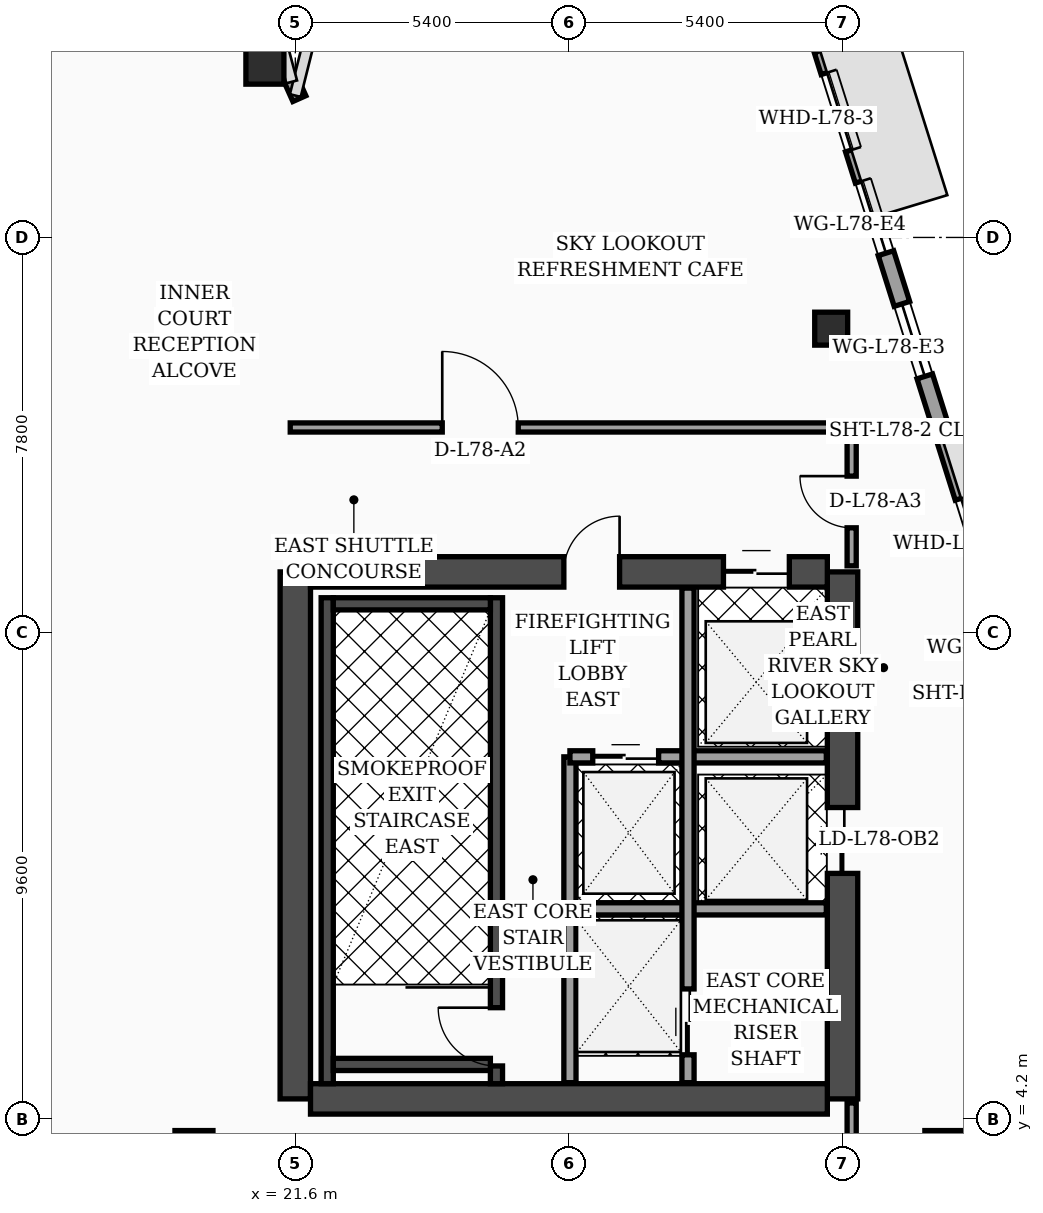
"""IFC4 building model, lengths in metres.
Left out: names, types, materials, properties, quantities, classifications, styles, units other than length and angle.
Written with IfcOpenShell. Run it as: python <this file> out.ifc"""

import sys

from ifc_helpers import new_model, si_unit, direction, frame, frame_2d, origin, origin_2d, place, context, subcontext, project, spatial, rectangle, hollow_rectangle, extrude, element, fill, save


model = new_model("IFC4")
c1 = context("Model", 3, precision=1e-05, world=origin(), true_north=direction((0.0, 1.0)))
c2 = subcontext(c1, "Body", "Model", "MODEL_VIEW")
j1 = project(units=[si_unit("LENGTHUNIT", "METRE"), si_unit("PLANEANGLEUNIT", "RADIAN")], contexts=[c1])
p1 = place(None, origin())
s1 = spatial("IfcSite", under=j1, at=p1, CompositionType="ELEMENT")
p2 = place(p1, origin())
s2 = spatial("IfcBuilding", under=s1, at=p2, CompositionType="ELEMENT")
p3 = place(p2, frame((0.0, 0.0, 316.0)))
s3 = spatial("IfcBuildingStorey", under=s2, at=p3, CompositionType="ELEMENT", Elevation=316.0)
p4 = place(p3, frame((21.6, 4.6, 0.0), z_axis=(0.0, 0.0, 1.0), x_axis=(0.0, 1.0, 0.0)))
e1 = element("IfcWall", 1, at=p4, inside=s3, PredefinedType="SHEAR", context=c2, shape_type="SweptSolid", body=[
    extrude(rectangle(XDim=10.4, YDim=0.6, at=frame_2d((5.2, 0.0))), origin(), (0.0, 0.0, 1.0), 4.26),
])
p5 = place(p3, frame((32.4, 4.6, 0.0), z_axis=(0.0, 0.0, 1.0), x_axis=(0.0, 1.0, 0.0)))
e2 = element("IfcWall", 2, at=p5, inside=s3, PredefinedType="SHEAR", context=c2, shape_type="SweptSolid", body=[
    extrude(rectangle(XDim=10.4, YDim=0.6, at=frame_2d((5.2, 0.0))), origin(), (0.0, 0.0, 1.0), 4.26),
])
p6 = place(p5, frame((4.45, 0.0, 0.0)))
e3 = element("IfcOpeningElement", 3, at=p6, cuts=e2, PredefinedType="OPENING", context=c2, shape_type="SweptSolid", body=[
    extrude(rectangle(XDim=1.3, YDim=2.35, at=frame_2d((0.65, 1.175))), frame((0.0, 0.31, 0.0), z_axis=(0.0, -1.0, 0.0), x_axis=(1.0, 0.0, 0.0)), (0.0, 0.0, 1.0), 0.62),
])
p7 = place(p3, frame((21.9, 15.0, 0.0), z_axis=(0.0, 0.0, 1.0), x_axis=(1.0, 0.0, 0.0)))
e4 = element("IfcWall", 4, at=p7, inside=s3, PredefinedType="SHEAR", context=c2, shape_type="SweptSolid", body=[
    extrude(rectangle(XDim=10.2, YDim=0.6, at=frame_2d((5.1, 0.0))), origin(), (0.0, 0.0, 1.0), 4.26),
])
p8 = place(p7, frame((5.0, 0.0, 0.0)))
e5 = element("IfcOpeningElement", 5, at=p8, cuts=e4, PredefinedType="OPENING", context=c2, shape_type="SweptSolid", body=[
    extrude(rectangle(XDim=1.1, YDim=2.2, at=frame_2d((0.55, 1.1))), frame((0.0, 0.31, 0.0), z_axis=(0.0, -1.0, 0.0), x_axis=(1.0, 0.0, 0.0)), (0.0, 0.0, 1.0), 0.62),
])
p9 = place(p7, frame((8.15, 0.0, 0.0)))
e6 = element("IfcOpeningElement", 6, at=p9, cuts=e4, PredefinedType="OPENING", context=c2, shape_type="SweptSolid", body=[
    extrude(rectangle(XDim=1.3, YDim=2.35, at=frame_2d((0.65, 1.175))), frame((0.0, 0.31, 0.0), z_axis=(0.0, -1.0, 0.0), x_axis=(1.0, 0.0, 0.0)), (0.0, 0.0, 1.0), 0.62),
])
p10 = place(p3, frame((21.9, 4.6, 0.0), z_axis=(0.0, 0.0, 1.0), x_axis=(1.0, 0.0, 0.0)))
e7 = element("IfcWall", 7, at=p10, inside=s3, PredefinedType="SHEAR", context=c2, shape_type="SweptSolid", body=[
    extrude(rectangle(XDim=10.2, YDim=0.6, at=frame_2d((5.1, 0.0))), origin(), (0.0, 0.0, 1.0), 4.26),
])
p11 = place(p3, frame((22.23, 4.9, 0.0), z_axis=(0.0, 0.0, 1.0), x_axis=(0.0, 1.0, 0.0)))
e8 = element("IfcWall", 8, at=p11, inside=s3, PredefinedType="SOLIDWALL", context=c2, shape_type="SweptSolid", body=[
    extrude(rectangle(XDim=9.59, YDim=0.24, at=frame_2d((4.795, 0.0))), origin(), (0.0, 0.0, 1.0), 4.26),
])
p12 = place(p3, frame((25.57, 4.9, 0.0), z_axis=(0.0, 0.0, 1.0), x_axis=(0.0, 1.0, 0.0)))
e9 = element("IfcWall", 9, at=p12, inside=s3, PredefinedType="SOLIDWALL", context=c2, shape_type="SweptSolid", body=[
    extrude(rectangle(XDim=9.59, YDim=0.24, at=frame_2d((4.795, 0.0))), origin(), (0.0, 0.0, 1.0), 4.26),
])
p13 = place(p12, frame((0.35, 0.0, 0.0)))
e10 = element("IfcOpeningElement", 10, at=p13, cuts=e9, PredefinedType="OPENING", context=c2, shape_type="SweptSolid", body=[
    extrude(rectangle(XDim=1.15, YDim=2.2, at=frame_2d((0.575, 1.1))), frame((0.0, 0.13, 0.0), z_axis=(0.0, -1.0, 0.0), x_axis=(1.0, 0.0, 0.0)), (0.0, 0.0, 1.0), 0.26),
])
for number, where, z_axis, x_axis in (
    (11, (22.35, 5.28, 0.0), (0.0, 0.0, 1.0), (1.0, 0.0, 0.0)),
    (12, (22.35, 14.37, 0.0), (0.0, 0.0, 1.0), (1.0, 0.0, 0.0)),
):
    element("IfcWall", number, at=place(p3, frame(where, z_axis=z_axis, x_axis=x_axis)), inside=s3, PredefinedType="SOLIDWALL", context=c2, shape_type="SweptSolid", body=[
        extrude(rectangle(XDim=3.1, YDim=0.24, at=frame_2d((1.55, 0.0))), origin(), (0.0, 0.0, 1.0), 4.26),
    ])
for number, where, z_axis, x_axis in (
    (13, (21.0, 25.0, 0.0), (0.0, 0.0, 1.0), (1.0, 0.0, 0.0)),
    (14, (19.6, 3.6, 0.0), (0.0, 0.0, 1.0), (1.0, 0.0, 0.0)),
    (15, (34.4, 3.6, 0.0), (0.0, 0.0, 1.0), (1.0, 0.0, 0.0)),
):
    element("IfcColumn", number, at=place(p3, frame(where, z_axis=z_axis, x_axis=x_axis)), inside=s3, PredefinedType="COLUMN", context=c2, shape_type="SweptSolid", body=[
        extrude(hollow_rectangle(XDim=0.75, YDim=0.75, WallThickness=0.032, at=origin_2d()), origin(), (0.0, 0.0, 1.0), 4.26),
    ])
p14 = place(p3, frame((32.176, 19.8, 0.0), z_axis=(0.0, 0.0, 1.0), x_axis=(1.0, 0.0, 0.0)))
e16 = element("IfcColumn", 16, at=p14, inside=s3, PredefinedType="COLUMN", context=c2, shape_type="SweptSolid", body=[
    extrude(hollow_rectangle(XDim=0.65, YDim=0.65, WallThickness=0.028, at=origin_2d()), origin(), (0.0, 0.0, 1.0), 4.26),
])
p15 = place(p3, frame((21.68, 24.34, 0.0), z_axis=(0.0, 0.0, 1.0), x_axis=(-0.40758134973, 0.913168901875, 0.0)))
e17 = element("IfcWall", 17, at=p15, inside=s3, PredefinedType="SOLIDWALL", context=c2, shape_type="SweptSolid", body=[
    extrude(rectangle(XDim=0.471, YDim=0.28, at=frame_2d((0.235, 0.0))), origin(), (0.0, 0.0, 1.0), 4.26),
])
p16 = place(p3, frame((38.23, 5.505, 0.0), z_axis=(0.0, 0.0, 1.0), x_axis=(-0.300509063924, 0.953778958931, 0.0)))
e18 = element("IfcWall", 18, at=p16, inside=s3, PredefinedType="SOLIDWALL", context=c2, shape_type="SweptSolid", body=[
    extrude(rectangle(XDim=30.814, YDim=0.32, at=frame_2d((15.407, 0.0))), origin(), (0.0, 0.0, 1.0), 4.26),
])
p17 = place(p16, frame((4.437, 0.0, 0.7)))
e19 = element("IfcOpeningElement", 19, at=p17, cuts=e18, PredefinedType="OPENING", context=c2, shape_type="SweptSolid", body=[
    extrude(rectangle(XDim=1.6, YDim=1.65, at=frame_2d((0.8, 0.825))), frame((0.0, 0.17, 0.0), z_axis=(0.0, -1.0, 0.0), x_axis=(1.0, 0.0, 0.0)), (0.0, 0.0, 1.0), 0.34),
])
p18 = place(p16, frame((9.889, 0.0, 0.7)))
e20 = element("IfcOpeningElement", 20, at=p18, cuts=e18, PredefinedType="OPENING", context=c2, shape_type="SweptSolid", body=[
    extrude(rectangle(XDim=1.6, YDim=1.65, at=frame_2d((0.8, 0.825))), frame((0.0, 0.17, 0.0), z_axis=(0.0, -1.0, 0.0), x_axis=(1.0, 0.0, 0.0)), (0.0, 0.0, 1.0), 0.34),
])
p19 = place(p16, frame((18.696, 0.0, 0.7)))
e21 = element("IfcOpeningElement", 21, at=p19, cuts=e18, PredefinedType="OPENING", context=c2, shape_type="SweptSolid", body=[
    extrude(rectangle(XDim=1.6, YDim=1.65, at=frame_2d((0.8, 0.825))), frame((0.0, 0.17, 0.0), z_axis=(0.0, -1.0, 0.0), x_axis=(1.0, 0.0, 0.0)), (0.0, 0.0, 1.0), 0.34),
])
p20 = place(p16, frame((1.6, 0.0, 0.75)))
e22 = element("IfcOpeningElement", 22, at=p20, cuts=e18, PredefinedType="OPENING", context=c2, shape_type="SweptSolid", body=[
    extrude(rectangle(XDim=1.5, YDim=1.6, at=frame_2d((0.75, 0.8))), frame((0.0, 0.17, 0.0), z_axis=(0.0, -1.0, 0.0), x_axis=(1.0, 0.0, 0.0)), (0.0, 0.0, 1.0), 0.34),
])
p21 = place(p16, frame((7.8, 0.0, 0.75)))
e23 = element("IfcOpeningElement", 23, at=p21, cuts=e18, PredefinedType="OPENING", context=c2, shape_type="SweptSolid", body=[
    extrude(rectangle(XDim=1.5, YDim=1.6, at=frame_2d((0.75, 0.8))), frame((0.0, 0.17, 0.0), z_axis=(0.0, -1.0, 0.0), x_axis=(1.0, 0.0, 0.0)), (0.0, 0.0, 1.0), 0.34),
])
p22 = place(p16, frame((14.0, 0.0, 0.75)))
e24 = element("IfcOpeningElement", 24, at=p22, cuts=e18, PredefinedType="OPENING", context=c2, shape_type="SweptSolid", body=[
    extrude(rectangle(XDim=1.5, YDim=1.6, at=frame_2d((0.75, 0.8))), frame((0.0, 0.17, 0.0), z_axis=(0.0, -1.0, 0.0), x_axis=(1.0, 0.0, 0.0)), (0.0, 0.0, 1.0), 0.34),
])
p23 = place(p16, frame((16.55, 0.0, 0.75)))
e25 = element("IfcOpeningElement", 25, at=p23, cuts=e18, PredefinedType="OPENING", context=c2, shape_type="SweptSolid", body=[
    extrude(rectangle(XDim=1.5, YDim=1.6, at=frame_2d((0.75, 0.8))), frame((0.0, 0.17, 0.0), z_axis=(0.0, -1.0, 0.0), x_axis=(1.0, 0.0, 0.0)), (0.0, 0.0, 1.0), 0.34),
])
p24 = place(p16, frame((20.75, 0.0, 0.75)))
e26 = element("IfcOpeningElement", 26, at=p24, cuts=e18, PredefinedType="OPENING", context=c2, shape_type="SweptSolid", body=[
    extrude(rectangle(XDim=1.5, YDim=1.6, at=frame_2d((0.75, 0.8))), frame((0.0, 0.17, 0.0), z_axis=(0.0, -1.0, 0.0), x_axis=(1.0, 0.0, 0.0)), (0.0, 0.0, 1.0), 0.34),
])
p25 = place(p16, frame((23.3, 0.0, 0.75)))
e27 = element("IfcOpeningElement", 27, at=p25, cuts=e18, PredefinedType="OPENING", context=c2, shape_type="SweptSolid", body=[
    extrude(rectangle(XDim=1.5, YDim=1.6, at=frame_2d((0.75, 0.8))), frame((0.0, 0.17, 0.0), z_axis=(0.0, -1.0, 0.0), x_axis=(1.0, 0.0, 0.0)), (0.0, 0.0, 1.0), 0.34),
])
p26 = place(p16, frame((26.4, 0.0, 0.75)))
e28 = element("IfcOpeningElement", 28, at=p26, cuts=e18, PredefinedType="OPENING", context=c2, shape_type="SweptSolid", body=[
    extrude(rectangle(XDim=1.5, YDim=1.6, at=frame_2d((0.75, 0.8))), frame((0.0, 0.17, 0.0), z_axis=(0.0, -1.0, 0.0), x_axis=(1.0, 0.0, 0.0)), (0.0, 0.0, 1.0), 0.34),
])
p27 = place(p3, frame((27.02, 4.92, 0.0), z_axis=(0.0, 0.0, 1.0), x_axis=(0.0, 1.0, 0.0)))
e29 = element("IfcWall", 29, at=p27, inside=s3, PredefinedType="SOLIDWALL", context=c2, shape_type="SweptSolid", body=[
    extrude(rectangle(XDim=6.43, YDim=0.24, at=frame_2d((3.215, 0.0))), origin(), (0.0, 0.0, 1.0), 2.54),
])
p28 = place(p3, frame((27.02, 11.35, 0.0), z_axis=(0.0, 0.0, 1.0), x_axis=(1.0, 0.0, 0.0)))
e30 = element("IfcWall", 30, at=p28, inside=s3, PredefinedType="SOLIDWALL", context=c2, shape_type="SweptSolid", body=[
    extrude(rectangle(XDim=5.06, YDim=0.24, at=frame_2d((2.53, 0.0))), origin(), (0.0, 0.0, 1.0), 2.54),
])
p29 = place(p28, frame((0.45, 0.0, 0.0)))
e31 = element("IfcOpeningElement", 31, at=p29, cuts=e30, PredefinedType="OPENING", context=c2, shape_type="SweptSolid", body=[
    extrude(rectangle(XDim=1.3, YDim=2.35, at=frame_2d((0.65, 1.175))), frame((0.0, 0.13, 0.0), z_axis=(0.0, -1.0, 0.0), x_axis=(1.0, 0.0, 0.0)), (0.0, 0.0, 1.0), 0.26),
])
p30 = place(p3, frame((27.02, 8.35, 0.0), z_axis=(0.0, 0.0, 1.0), x_axis=(1.0, 0.0, 0.0)))
e32 = element("IfcWall", 32, at=p30, inside=s3, PredefinedType="SOLIDWALL", context=c2, shape_type="SweptSolid", body=[
    extrude(rectangle(XDim=5.06, YDim=0.24, at=frame_2d((2.53, 0.0))), origin(), (0.0, 0.0, 1.0), 2.54),
])
p31 = place(p3, frame((29.35, 4.92, 0.0), z_axis=(0.0, 0.0, 1.0), x_axis=(0.0, 1.0, 0.0)))
e33 = element("IfcWall", 33, at=p31, inside=s3, PredefinedType="SOLIDWALL", context=c2, shape_type="SweptSolid", body=[
    extrude(rectangle(XDim=9.76, YDim=0.24, at=frame_2d((4.88, 0.0))), origin(), (0.0, 0.0, 1.0), 2.54),
])
p32 = place(p31, frame((0.55, 0.0, 0.0)))
e34 = element("IfcOpeningElement", 34, at=p32, cuts=e33, PredefinedType="OPENING", context=c2, shape_type="SweptSolid", body=[
    extrude(rectangle(XDim=1.3, YDim=2.35, at=frame_2d((0.65, 1.175))), frame((0.0, 0.13, 0.0), z_axis=(0.0, -1.0, 0.0), x_axis=(1.0, 0.0, 0.0)), (0.0, 0.0, 1.0), 0.26),
])
p33 = place(p3, frame((21.5, 17.85, 0.0), z_axis=(0.0, 0.0, 1.0), x_axis=(1.0, 0.0, 0.0)))
e35 = element("IfcWall", 35, at=p33, inside=s3, PredefinedType="PARTITIONING", context=c2, shape_type="SweptSolid", body=[
    extrude(rectangle(XDim=12.78, YDim=0.18, at=frame_2d((6.39, 0.0))), origin(), (0.0, 0.0, 1.0), 2.54),
])
p34 = place(p33, frame((3.0, 0.0, 0.0)))
e36 = element("IfcOpeningElement", 36, at=p34, cuts=e35, PredefinedType="OPENING", context=c2, shape_type="SweptSolid", body=[
    extrude(rectangle(XDim=1.5, YDim=2.22, at=frame_2d((0.75, 1.11))), frame((0.0, 0.1, 0.0), z_axis=(0.0, -1.0, 0.0), x_axis=(1.0, 0.0, 0.0)), (0.0, 0.0, 1.0), 0.2),
])
p35 = place(p3, frame((32.58, 15.12, 0.0), z_axis=(0.0, 0.0, 1.0), x_axis=(0.0, 1.0, 0.0)))
e37 = element("IfcWall", 37, at=p35, inside=s3, PredefinedType="PARTITIONING", context=c2, shape_type="SweptSolid", body=[
    extrude(rectangle(XDim=2.66, YDim=0.18, at=frame_2d((1.33, 0.0))), origin(), (0.0, 0.0, 1.0), 2.54),
])
p36 = place(p35, frame((0.75, 0.0, 0.0)))
e38 = element("IfcOpeningElement", 38, at=p36, cuts=e37, PredefinedType="OPENING", context=c2, shape_type="SweptSolid", body=[
    extrude(rectangle(XDim=1.02, YDim=2.2, at=frame_2d((0.51, 1.1))), frame((0.0, 0.1, 0.0), z_axis=(0.0, -1.0, 0.0), x_axis=(1.0, 0.0, 0.0)), (0.0, 0.0, 1.0), 0.2),
])
p37 = place(p3, frame((32.58, 2.6, 0.0), z_axis=(0.0, 0.0, 1.0), x_axis=(0.0, 1.0, 0.0)))
e39 = element("IfcWall", 39, at=p37, inside=s3, PredefinedType="PARTITIONING", context=c2, shape_type="SweptSolid", body=[
    extrude(rectangle(XDim=1.92, YDim=0.18, at=frame_2d((0.96, 0.0))), origin(), (0.0, 0.0, 1.0), 2.54),
])
p38 = place(p18, origin())
e40 = element("IfcWindow", 40, at=p38, inside=s3, PartitioningType="SINGLE_PANEL", PredefinedType="WINDOW", context=c2, shape_type="SweptSolid", body=[
    extrude(rectangle(XDim=1.6, YDim=1.65, at=frame_2d((0.8, 0.825))), frame((0.0, 0.03, 0.0), z_axis=(0.0, -1.0, 0.0), x_axis=(1.0, 0.0, 0.0)), (0.0, 0.0, 1.0), 0.06),
])
fill(e20, e40)
p39 = place(p19, origin())
e41 = element("IfcWindow", 41, at=p39, inside=s3, PartitioningType="SINGLE_PANEL", PredefinedType="WINDOW", context=c2, shape_type="SweptSolid", body=[
    extrude(rectangle(XDim=1.6, YDim=1.65, at=frame_2d((0.8, 0.825))), frame((0.0, 0.03, 0.0), z_axis=(0.0, -1.0, 0.0), x_axis=(1.0, 0.0, 0.0)), (0.0, 0.0, 1.0), 0.06),
])
fill(e21, e41)
p40 = place(p22, origin())
e42 = element("IfcWindow", 42, at=p40, inside=s3, PartitioningType="SINGLE_PANEL", PredefinedType="WINDOW", context=c2, shape_type="SweptSolid", body=[
    extrude(rectangle(XDim=1.5, YDim=1.6, at=frame_2d((0.75, 0.8))), frame((0.0, 0.03, 0.0), z_axis=(0.0, -1.0, 0.0), x_axis=(1.0, 0.0, 0.0)), (0.0, 0.0, 1.0), 0.06),
])
fill(e24, e42)
p41 = place(p23, origin())
e43 = element("IfcWindow", 43, at=p41, inside=s3, PartitioningType="SINGLE_PANEL", PredefinedType="WINDOW", context=c2, shape_type="SweptSolid", body=[
    extrude(rectangle(XDim=1.5, YDim=1.6, at=frame_2d((0.75, 0.8))), frame((0.0, 0.03, 0.0), z_axis=(0.0, -1.0, 0.0), x_axis=(1.0, 0.0, 0.0)), (0.0, 0.0, 1.0), 0.06),
])
fill(e25, e43)
p42 = place(p29, origin())
e44 = element("IfcDoor", 44, at=p42, inside=s3, OperationType="DOUBLE_DOOR_SLIDING", PredefinedType="DOOR", context=c2, shape_type="SweptSolid", body=[
    extrude(rectangle(XDim=1.3, YDim=2.35, at=frame_2d((0.65, 1.175))), frame((0.0, 0.025, 0.0), z_axis=(0.0, -1.0, 0.0), x_axis=(1.0, 0.0, 0.0)), (0.0, 0.0, 1.0), 0.05),
])
fill(e31, e44)
p43 = place(p32, origin())
e45 = element("IfcDoor", 45, at=p43, inside=s3, OperationType="DOUBLE_DOOR_SLIDING", PredefinedType="DOOR", context=c2, shape_type="SweptSolid", body=[
    extrude(rectangle(XDim=1.3, YDim=2.35, at=frame_2d((0.65, 1.175))), frame((0.0, 0.025, 0.0), z_axis=(0.0, -1.0, 0.0), x_axis=(1.0, 0.0, 0.0)), (0.0, 0.0, 1.0), 0.05),
])
fill(e34, e45)
p44 = place(p34, origin())
e46 = element("IfcDoor", 46, at=p44, inside=s3, OperationType="SINGLE_SWING_LEFT", PredefinedType="DOOR", context=c2, shape_type="SweptSolid", body=[
    extrude(rectangle(XDim=1.5, YDim=2.22, at=frame_2d((0.75, 1.11))), frame((0.0, 0.025, 0.0), z_axis=(0.0, -1.0, 0.0), x_axis=(1.0, 0.0, 0.0)), (0.0, 0.0, 1.0), 0.05),
])
fill(e36, e46)
p45 = place(p36, origin())
e47 = element("IfcDoor", 47, at=p45, inside=s3, OperationType="SINGLE_SWING_RIGHT", PredefinedType="DOOR", context=c2, shape_type="SweptSolid", body=[
    extrude(rectangle(XDim=1.02, YDim=2.2, at=frame_2d((0.51, 1.1))), frame((0.0, 0.025, 0.0), z_axis=(0.0, -1.0, 0.0), x_axis=(1.0, 0.0, 0.0)), (0.0, 0.0, 1.0), 0.05),
])
fill(e38, e47)
p46 = place(p13, origin())
e48 = element("IfcDoor", 48, at=p46, inside=s3, OperationType="SINGLE_SWING_RIGHT", PredefinedType="DOOR", context=c2, shape_type="SweptSolid", body=[
    extrude(rectangle(XDim=1.15, YDim=2.2, at=frame_2d((0.575, 1.1))), frame((0.0, 0.025, 0.0), z_axis=(0.0, -1.0, 0.0), x_axis=(1.0, 0.0, 0.0)), (0.0, 0.0, 1.0), 0.05),
])
fill(e10, e48)
p47 = place(p8, origin())
e49 = element("IfcDoor", 49, at=p47, inside=s3, OperationType="SINGLE_SWING_RIGHT", PredefinedType="DOOR", context=c2, shape_type="SweptSolid", body=[
    extrude(rectangle(XDim=1.1, YDim=2.2, at=frame_2d((0.55, 1.1))), frame((0.0, 0.025, 0.0), z_axis=(0.0, -1.0, 0.0), x_axis=(1.0, 0.0, 0.0)), (0.0, 0.0, 1.0), 0.05),
])
fill(e5, e49)
p48 = place(p9, origin())
e50 = element("IfcDoor", 50, at=p48, inside=s3, OperationType="DOUBLE_DOOR_SLIDING", PredefinedType="DOOR", context=c2, shape_type="SweptSolid", body=[
    extrude(rectangle(XDim=1.3, YDim=2.35, at=frame_2d((0.65, 1.175))), frame((0.0, 0.025, 0.0), z_axis=(0.0, -1.0, 0.0), x_axis=(1.0, 0.0, 0.0)), (0.0, 0.0, 1.0), 0.05),
])
fill(e6, e50)
p49 = place(p6, origin())
e51 = element("IfcDoor", 51, at=p49, inside=s3, OperationType="DOUBLE_DOOR_SLIDING", PredefinedType="DOOR", context=c2, shape_type="SweptSolid", body=[
    extrude(rectangle(XDim=1.3, YDim=2.35, at=frame_2d((0.65, 1.175))), frame((0.0, 0.025, 0.0), z_axis=(0.0, -1.0, 0.0), x_axis=(1.0, 0.0, 0.0)), (0.0, 0.0, 1.0), 0.05),
])
fill(e3, e51)
save(model, sys.argv[1])
